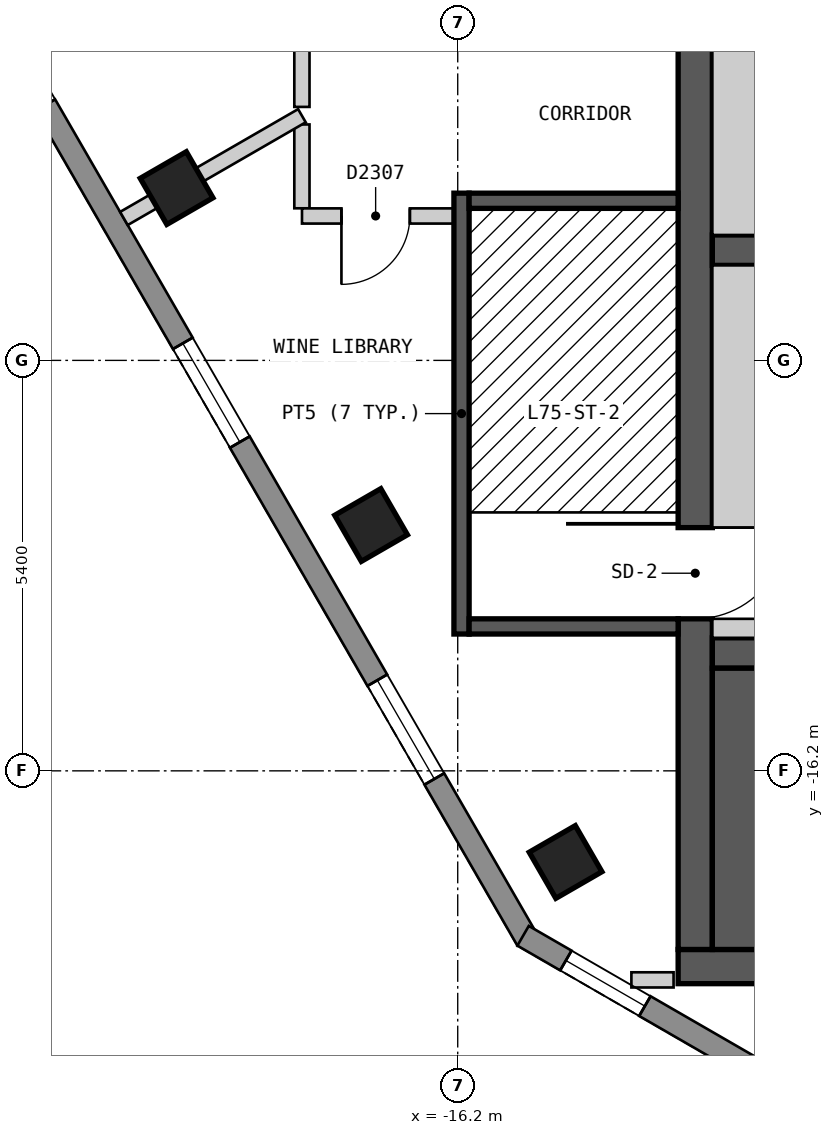
"""IFC4 building model, lengths in metres.
Left out: names, types, materials, properties, quantities, classifications, styles, units other than length and angle.
Written with IfcOpenShell. Run it as: python <this file> out.ifc"""

import sys

from ifc_helpers import new_model, si_unit, direction, frame, frame_2d, origin, origin_2d, place, context, subcontext, project, spatial, polyline, rectangle, outline, extrude, element, fill, save


model = new_model("IFC4")
c1 = context("Model", 3, precision=1e-05, world=origin(), true_north=direction((0.0, 1.0)))
c2 = subcontext(c1, "Body", "Model", "MODEL_VIEW")
j1 = project(units=[si_unit("LENGTHUNIT", "METRE"), si_unit("PLANEANGLEUNIT", "RADIAN")], contexts=[c1])
p1 = place(None, origin())
s1 = spatial("IfcSite", under=j1, at=p1, CompositionType="ELEMENT")
p2 = place(p1, origin())
s2 = spatial("IfcBuilding", under=s1, at=p2, CompositionType="ELEMENT")
p3 = place(p2, frame((0.0, 0.0, 241.8)))
s3 = spatial("IfcBuildingStorey", under=s2, at=p3, CompositionType="ELEMENT", Elevation=241.8)
for number, where, z_axis, x_axis in (
    (1, (-19.899, -8.533, 0.0), (0.0, 0.0, 1.0), (0.5, -0.866, 0.0)),
    (2, (-17.34, -12.966, 0.0), (0.0, 0.0, 1.0), (0.5, -0.866, 0.0)),
    (3, (-14.781, -17.399, 0.0), (0.0, 0.0, 1.0), (0.5, -0.866, 0.0)),
):
    element("IfcColumn", number, at=place(p3, frame(where, z_axis=z_axis, x_axis=x_axis)), inside=s3, PredefinedType="COLUMN", context=c2, shape_type="SweptSolid", body=[
        extrude(rectangle(XDim=0.7, YDim=0.7, at=origin_2d()), origin(), (0.0, 0.0, 1.0), 3.0),
    ])
p4 = place(p3, frame((-13.3, -18.775, 0.0), z_axis=(0.0, 0.0, 1.0), x_axis=(1.0, 0.0, 0.0)))
e4 = element("IfcWall", 4, at=p4, inside=s3, PredefinedType="SHEAR", context=c2, shape_type="SweptSolid", body=[
    extrude(rectangle(XDim=26.6, YDim=0.45, at=frame_2d((13.3, 0.0))), origin(), (0.0, 0.0, 1.0), 2.2),
])
p5 = place(p4, frame((10.25, 0.0, 0.0)))
e5 = element("IfcOpeningElement", 5, at=p5, cuts=e4, PredefinedType="OPENING", context=c2, shape_type="SweptSolid", body=[
    extrude(rectangle(XDim=0.9, YDim=2.1, at=frame_2d((0.45, 1.05))), frame((0.0, 0.235, 0.0), z_axis=(0.0, -1.0, 0.0), x_axis=(1.0, 0.0, 0.0)), (0.0, 0.0, 1.0), 0.47),
])
p6 = place(p3, frame((-13.075, -18.55, 0.0), z_axis=(0.0, 0.0, 1.0), x_axis=(0.0, 1.0, 0.0)))
e6 = element("IfcWall", 6, at=p6, inside=s3, PredefinedType="SHEAR", context=c2, shape_type="SweptSolid", body=[
    extrude(rectangle(XDim=13.1, YDim=0.45, at=frame_2d((6.55, 0.0))), origin(), (0.0, 0.0, 1.0), 2.2),
])
p7 = place(p6, frame((4.35, 0.0, 0.0)))
e7 = element("IfcOpeningElement", 7, at=p7, cuts=e6, PredefinedType="OPENING", context=c2, shape_type="SweptSolid", body=[
    extrude(rectangle(XDim=1.2, YDim=2.1, at=frame_2d((0.6, 1.05))), frame((0.0, 0.235, 0.0), z_axis=(0.0, -1.0, 0.0), x_axis=(1.0, 0.0, 0.0)), (0.0, 0.0, 1.0), 0.47),
])
p8 = place(p3, frame((-12.85, -14.65, 0.0), z_axis=(0.0, 0.0, 1.0), x_axis=(1.0, 0.0, 0.0)))
e8 = element("IfcWall", 8, at=p8, inside=s3, PredefinedType="SHEAR", context=c2, shape_type="SweptSolid", body=[
    extrude(rectangle(XDim=25.7, YDim=0.4, at=frame_2d((12.85, 0.0))), origin(), (0.0, 0.0, 1.0), 2.2),
])
p9 = place(p8, frame((2.05, 0.0, 0.0), z_axis=(0.0, 0.0, 1.0), x_axis=(-1.0, 0.0, 0.0)))
e9 = element("IfcOpeningElement", 9, at=p9, cuts=e8, PredefinedType="OPENING", context=c2, shape_type="SweptSolid", body=[
    extrude(rectangle(XDim=1.2, YDim=2.1, at=frame_2d((0.6, 1.05))), frame((0.0, 0.21, 0.0), z_axis=(0.0, -1.0, 0.0), x_axis=(1.0, 0.0, 0.0)), (0.0, 0.0, 1.0), 0.42),
])
p10 = place(p8, frame((24.9, 0.0, 0.0), z_axis=(0.0, 0.0, 1.0), x_axis=(-1.0, 0.0, 0.0)))
e10 = element("IfcOpeningElement", 10, at=p10, cuts=e8, PredefinedType="OPENING", context=c2, shape_type="SweptSolid", body=[
    extrude(rectangle(XDim=1.2, YDim=2.1, at=frame_2d((0.6, 1.05))), frame((0.0, 0.21, 0.0), z_axis=(0.0, -1.0, 0.0), x_axis=(1.0, 0.0, 0.0)), (0.0, 0.0, 1.0), 0.42),
])
p11 = place(p8, frame((10.0, 0.0, 0.0), z_axis=(0.0, 0.0, 1.0), x_axis=(-1.0, 0.0, 0.0)))
e11 = element("IfcOpeningElement", 11, at=p11, cuts=e8, PredefinedType="OPENING", context=c2, shape_type="SweptSolid", body=[
    extrude(rectangle(XDim=1.0, YDim=2.1, at=frame_2d((0.5, 1.05))), frame((0.0, 0.21, 0.0), z_axis=(0.0, -1.0, 0.0), x_axis=(1.0, 0.0, 0.0)), (0.0, 0.0, 1.0), 0.42),
])
p12 = place(p8, frame((16.4, 0.0, 0.0), z_axis=(0.0, 0.0, 1.0), x_axis=(-1.0, 0.0, 0.0)))
e12 = element("IfcOpeningElement", 12, at=p12, cuts=e8, PredefinedType="OPENING", context=c2, shape_type="SweptSolid", body=[
    extrude(rectangle(XDim=1.0, YDim=2.1, at=frame_2d((0.5, 1.05))), frame((0.0, 0.21, 0.0), z_axis=(0.0, -1.0, 0.0), x_axis=(1.0, 0.0, 0.0)), (0.0, 0.0, 1.0), 0.42),
])
p13 = place(p3, frame((-12.85, -9.35, 0.0), z_axis=(0.0, 0.0, 1.0), x_axis=(1.0, 0.0, 0.0)))
e13 = element("IfcWall", 13, at=p13, inside=s3, PredefinedType="SHEAR", context=c2, shape_type="SweptSolid", body=[
    extrude(rectangle(XDim=23.05, YDim=0.4, at=frame_2d((11.525, 0.0))), origin(), (0.0, 0.0, 1.0), 2.2),
])
p14 = place(p13, frame((1.45, 0.0, 0.0)))
e14 = element("IfcOpeningElement", 14, at=p14, cuts=e13, PredefinedType="OPENING", context=c2, shape_type="SweptSolid", body=[
    extrude(rectangle(XDim=1.1, YDim=2.1, at=frame_2d((0.55, 1.05))), frame((0.0, 0.21, 0.0), z_axis=(0.0, -1.0, 0.0), x_axis=(1.0, 0.0, 0.0)), (0.0, 0.0, 1.0), 0.42),
])
p15 = place(p13, frame((4.25, 0.0, 0.0)))
e15 = element("IfcOpeningElement", 15, at=p15, cuts=e13, PredefinedType="OPENING", context=c2, shape_type="SweptSolid", body=[
    extrude(rectangle(XDim=1.1, YDim=2.1, at=frame_2d((0.55, 1.05))), frame((0.0, 0.21, 0.0), z_axis=(0.0, -1.0, 0.0), x_axis=(1.0, 0.0, 0.0)), (0.0, 0.0, 1.0), 0.42),
])
p16 = place(p13, frame((7.05, 0.0, 0.0)))
e16 = element("IfcOpeningElement", 16, at=p16, cuts=e13, PredefinedType="OPENING", context=c2, shape_type="SweptSolid", body=[
    extrude(rectangle(XDim=1.1, YDim=2.1, at=frame_2d((0.55, 1.05))), frame((0.0, 0.21, 0.0), z_axis=(0.0, -1.0, 0.0), x_axis=(1.0, 0.0, 0.0)), (0.0, 0.0, 1.0), 0.42),
])
p17 = place(p13, frame((9.35, 0.0, 0.0)))
e17 = element("IfcOpeningElement", 17, at=p17, cuts=e13, PredefinedType="OPENING", context=c2, shape_type="SweptSolid", body=[
    extrude(rectangle(XDim=1.1, YDim=2.1, at=frame_2d((0.55, 1.05))), frame((0.0, 0.21, 0.0), z_axis=(0.0, -1.0, 0.0), x_axis=(1.0, 0.0, 0.0)), (0.0, 0.0, 1.0), 0.42),
])
p18 = place(p13, frame((11.65, 0.0, 0.0)))
e18 = element("IfcOpeningElement", 18, at=p18, cuts=e13, PredefinedType="OPENING", context=c2, shape_type="SweptSolid", body=[
    extrude(rectangle(XDim=1.1, YDim=2.1, at=frame_2d((0.55, 1.05))), frame((0.0, 0.21, 0.0), z_axis=(0.0, -1.0, 0.0), x_axis=(1.0, 0.0, 0.0)), (0.0, 0.0, 1.0), 0.42),
])
p19 = place(p13, frame((13.95, 0.0, 0.0)))
e19 = element("IfcOpeningElement", 19, at=p19, cuts=e13, PredefinedType="OPENING", context=c2, shape_type="SweptSolid", body=[
    extrude(rectangle(XDim=1.1, YDim=2.1, at=frame_2d((0.55, 1.05))), frame((0.0, 0.21, 0.0), z_axis=(0.0, -1.0, 0.0), x_axis=(1.0, 0.0, 0.0)), (0.0, 0.0, 1.0), 0.42),
])
p20 = place(p13, frame((16.25, 0.0, 0.0)))
e20 = element("IfcOpeningElement", 20, at=p20, cuts=e13, PredefinedType="OPENING", context=c2, shape_type="SweptSolid", body=[
    extrude(rectangle(XDim=1.1, YDim=2.1, at=frame_2d((0.55, 1.05))), frame((0.0, 0.21, 0.0), z_axis=(0.0, -1.0, 0.0), x_axis=(1.0, 0.0, 0.0)), (0.0, 0.0, 1.0), 0.42),
])
p21 = place(p13, frame((18.55, 0.0, 0.0)))
e21 = element("IfcOpeningElement", 21, at=p21, cuts=e13, PredefinedType="OPENING", context=c2, shape_type="SweptSolid", body=[
    extrude(rectangle(XDim=1.1, YDim=2.1, at=frame_2d((0.55, 1.05))), frame((0.0, 0.21, 0.0), z_axis=(0.0, -1.0, 0.0), x_axis=(1.0, 0.0, 0.0)), (0.0, 0.0, 1.0), 0.42),
])
p22 = place(p13, frame((20.95, 0.0, 0.0)))
e22 = element("IfcOpeningElement", 22, at=p22, cuts=e13, PredefinedType="OPENING", context=c2, shape_type="SweptSolid", body=[
    extrude(rectangle(XDim=1.1, YDim=2.1, at=frame_2d((0.55, 1.05))), frame((0.0, 0.21, 0.0), z_axis=(0.0, -1.0, 0.0), x_axis=(1.0, 0.0, 0.0)), (0.0, 0.0, 1.0), 0.42),
])
p23 = place(p3, frame((-23.599, -4.025, 0.0), z_axis=(0.0, 0.0, 1.0), x_axis=(0.500012653391, -0.866018098222, 0.0)))
e23 = element("IfcWall", 23, at=p23, inside=s3, PredefinedType="SOLIDWALL", context=c2, shape_type="SweptSolid", body=[
    extrude(outline(polyline([(0.0, -0.15), (16.628, -0.15), (16.548, 0.15), (0.08, 0.15), (0.0, -0.15)])), origin(), (0.0, 0.0, 1.0), 2.2),
])
p24 = place(p23, frame((2.444, 0.0, 0.15)))
e24 = element("IfcOpeningElement", 24, at=p24, cuts=e23, PredefinedType="OPENING", context=c2, shape_type="SweptSolid", body=[
    extrude(rectangle(XDim=1.5, YDim=2.1, at=frame_2d((0.75, 1.05))), frame((0.0, 0.16, 0.0), z_axis=(0.0, -1.0, 0.0), x_axis=(1.0, 0.0, 0.0)), (0.0, 0.0, 1.0), 0.32),
])
p25 = place(p23, frame((7.564, 0.0, 0.15)))
e25 = element("IfcOpeningElement", 25, at=p25, cuts=e23, PredefinedType="OPENING", context=c2, shape_type="SweptSolid", body=[
    extrude(rectangle(XDim=1.5, YDim=2.1, at=frame_2d((0.75, 1.05))), frame((0.0, 0.16, 0.0), z_axis=(0.0, -1.0, 0.0), x_axis=(1.0, 0.0, 0.0)), (0.0, 0.0, 1.0), 0.32),
])
p26 = place(p23, frame((12.682, 0.0, 0.15)))
e26 = element("IfcOpeningElement", 26, at=p26, cuts=e23, PredefinedType="OPENING", context=c2, shape_type="SweptSolid", body=[
    extrude(rectangle(XDim=1.5, YDim=2.1, at=frame_2d((0.75, 1.05))), frame((0.0, 0.16, 0.0), z_axis=(0.0, -1.0, 0.0), x_axis=(1.0, 0.0, 0.0)), (0.0, 0.0, 1.0), 0.32),
])
p27 = place(p3, frame((-15.34, -18.37, 0.0), z_axis=(0.0, 0.0, 1.0), x_axis=(0.866022959057, -0.500004234368, 0.0)))
e27 = element("IfcWall", 27, at=p27, inside=s3, PredefinedType="SOLIDWALL", context=c2, shape_type="SweptSolid", body=[
    extrude(outline(polyline([(0.0, -0.15), (5.0, -0.15), (4.92, 0.15), (0.08, 0.15), (0.0, -0.15)])), origin(), (0.0, 0.0, 1.0), 2.2),
])
p28 = place(p27, frame((0.65, 0.0, 0.15)))
e28 = element("IfcOpeningElement", 28, at=p28, cuts=e27, PredefinedType="OPENING", context=c2, shape_type="SweptSolid", body=[
    extrude(rectangle(XDim=1.2, YDim=2.1, at=frame_2d((0.6, 1.05))), frame((0.0, 0.16, 0.0), z_axis=(0.0, -1.0, 0.0), x_axis=(1.0, 0.0, 0.0)), (0.0, 0.0, 1.0), 0.32),
])
p29 = place(p3, frame((-18.25, -7.696, 0.0), z_axis=(0.0, 0.0, 1.0), x_axis=(0.0, -1.0, 0.0)))
e29 = element("IfcWall", 29, at=p29, inside=s3, PredefinedType="PARTITIONING", context=c2, shape_type="SweptSolid", body=[
    extrude(rectangle(XDim=1.103, YDim=0.2, at=frame_2d((0.552, 0.0))), origin(), (0.0, 0.0, 1.0), 2.2),
])
p30 = place(p3, frame((-18.249, -8.9, 0.0), z_axis=(0.0, 0.0, 1.0), x_axis=(1.0, 0.0, 0.0)))
e30 = element("IfcWall", 30, at=p30, inside=s3, PredefinedType="PARTITIONING", context=c2, shape_type="SweptSolid", body=[
    extrude(rectangle(XDim=2.199, YDim=0.2, at=frame_2d((1.1, 0.0))), origin(), (0.0, 0.0, 1.0), 2.2),
])
p31 = place(p30, frame((0.519, 0.0, 0.0)))
e31 = element("IfcOpeningElement", 31, at=p31, cuts=e30, PredefinedType="OPENING", context=c2, shape_type="SweptSolid", body=[
    extrude(rectangle(XDim=0.9, YDim=2.1, at=frame_2d((0.45, 1.05))), frame((0.0, 0.11, 0.0), z_axis=(0.0, -1.0, 0.0), x_axis=(1.0, 0.0, 0.0)), (0.0, 0.0, 1.0), 0.22),
])
p32 = place(p3, frame((-18.25, -7.465, 0.0), z_axis=(0.0, 0.0, 1.0), x_axis=(0.0, 1.0, 0.0)))
e32 = element("IfcWall", 32, at=p32, inside=s3, PredefinedType="PARTITIONING", context=c2, shape_type="SweptSolid", body=[
    extrude(rectangle(XDim=0.864, YDim=0.2, at=frame_2d((0.432, 0.0))), origin(), (0.0, 0.0, 1.0), 2.2),
])
p33 = place(p3, frame((-13.915, -18.95, 0.0), z_axis=(0.0, 0.0, 1.0), x_axis=(1.0, 0.0, 0.0)))
e33 = element("IfcWall", 33, at=p33, inside=s3, PredefinedType="PARTITIONING", context=c2, shape_type="SweptSolid", body=[
    extrude(rectangle(XDim=0.555, YDim=0.2, at=frame_2d((0.277, 0.0))), origin(), (0.0, 0.0, 1.0), 2.2),
])
p34 = place(p3, frame((-20.592, -8.933, 0.0), z_axis=(0.0, 0.0, 1.0), x_axis=(0.866045775131, 0.499964714133, 0.0)))
e34 = element("IfcWall", 34, at=p34, inside=s3, PredefinedType="PARTITIONING", context=c2, shape_type="SweptSolid", body=[
    extrude(rectangle(XDim=2.704, YDim=0.2, at=frame_2d((1.352, 0.0))), origin(), (0.0, 0.0, 1.0), 2.2),
])
p35 = place(p3, frame((-16.15, -14.4, 0.0), z_axis=(0.0, 0.0, 1.0), x_axis=(0.0, 1.0, 0.0)))
e35 = element("IfcWall", 35, at=p35, inside=s3, PredefinedType="SOLIDWALL", context=c2, shape_type="SweptSolid", body=[
    extrude(rectangle(XDim=5.8, YDim=0.2, at=frame_2d((2.9, 0.0))), origin(), (0.0, 0.0, 1.0), 2.2),
])
for number, where, z_axis, x_axis in (
    (36, (-16.05, -14.3, 0.0), (0.0, 0.0, 1.0), (1.0, 0.0, 0.0)),
    (37, (-16.05, -8.7, 0.0), (0.0, 0.0, 1.0), (1.0, 0.0, 0.0)),
):
    element("IfcWall", number, at=place(p3, frame(where, z_axis=z_axis, x_axis=x_axis)), inside=s3, PredefinedType="SOLIDWALL", context=c2, shape_type="SweptSolid", body=[
        extrude(rectangle(XDim=2.75, YDim=0.2, at=frame_2d((1.375, 0.0))), origin(), (0.0, 0.0, 1.0), 2.2),
    ])
p36 = place(p3, frame((-12.475, -18.55, 0.0), z_axis=(0.0, 0.0, 1.0), x_axis=(0.0, 1.0, 0.0)))
e38 = element("IfcWall", 38, at=p36, inside=s3, PredefinedType="SOLIDWALL", context=c2, shape_type="SweptSolid", body=[
    extrude(rectangle(XDim=3.7, YDim=0.75, at=frame_2d((1.85, 0.0))), origin(), (0.0, 0.0, 1.0), 2.2),
])
p37 = place(p3, frame((-12.85, -14.325, 0.0), z_axis=(0.0, 0.0, 1.0), x_axis=(1.0, 0.0, 0.0)))
e39 = element("IfcWall", 39, at=p37, inside=s3, PredefinedType="PARTITIONING", context=c2, shape_type="SweptSolid", body=[
    extrude(rectangle(XDim=0.75, YDim=0.25, at=frame_2d((0.375, 0.0))), origin(), (0.0, 0.0, 1.0), 2.2),
])
p38 = place(p3, frame((-12.475, -13.0, 0.0), z_axis=(0.0, 0.0, 1.0), x_axis=(0.0, 1.0, 0.0)))
e40 = element("IfcWall", 40, at=p38, inside=s3, PredefinedType="PARTITIONING", context=c2, shape_type="SweptSolid", body=[
    extrude(rectangle(XDim=3.45, YDim=0.75, at=frame_2d((1.725, 0.0))), origin(), (0.0, 0.0, 1.0), 2.2),
])
p39 = place(p3, frame((-12.475, -9.15, 0.0), z_axis=(0.0, 0.0, 1.0), x_axis=(0.0, 1.0, 0.0)))
e41 = element("IfcWall", 41, at=p39, inside=s3, PredefinedType="SOLIDWALL", context=c2, shape_type="SweptSolid", body=[
    extrude(rectangle(XDim=3.7, YDim=0.75, at=frame_2d((1.85, 0.0))), origin(), (0.0, 0.0, 1.0), 2.2),
])
p40 = place(p25, origin())
e42 = element("IfcWindow", 42, at=p40, inside=s3, PartitioningType="SINGLE_PANEL", PredefinedType="WINDOW", context=c2, shape_type="SweptSolid", body=[
    extrude(rectangle(XDim=1.5, YDim=2.1, at=frame_2d((0.75, 1.05))), frame((0.0, 0.03, 0.0), z_axis=(0.0, -1.0, 0.0), x_axis=(1.0, 0.0, 0.0)), (0.0, 0.0, 1.0), 0.06),
])
fill(e25, e42)
p41 = place(p26, origin())
e43 = element("IfcWindow", 43, at=p41, inside=s3, PartitioningType="SINGLE_PANEL", PredefinedType="WINDOW", context=c2, shape_type="SweptSolid", body=[
    extrude(rectangle(XDim=1.5, YDim=2.1, at=frame_2d((0.75, 1.05))), frame((0.0, 0.03, 0.0), z_axis=(0.0, -1.0, 0.0), x_axis=(1.0, 0.0, 0.0)), (0.0, 0.0, 1.0), 0.06),
])
fill(e26, e43)
p42 = place(p28, origin())
e44 = element("IfcWindow", 44, at=p42, inside=s3, PartitioningType="SINGLE_PANEL", PredefinedType="WINDOW", context=c2, shape_type="SweptSolid", body=[
    extrude(rectangle(XDim=1.2, YDim=2.1, at=frame_2d((0.6, 1.05))), frame((0.0, 0.03, 0.0), z_axis=(0.0, -1.0, 0.0), x_axis=(1.0, 0.0, 0.0)), (0.0, 0.0, 1.0), 0.06),
])
fill(e28, e44)
p43 = place(p31, origin())
e45 = element("IfcDoor", 45, at=p43, inside=s3, OperationType="SINGLE_SWING_LEFT", PredefinedType="DOOR", context=c2, shape_type="SweptSolid", body=[
    extrude(rectangle(XDim=0.9, YDim=2.1, at=frame_2d((0.45, 1.05))), frame((0.0, 0.025, 0.0), z_axis=(0.0, -1.0, 0.0), x_axis=(1.0, 0.0, 0.0)), (0.0, 0.0, 1.0), 0.05),
])
fill(e31, e45)
p44 = place(p7, origin())
e46 = element("IfcDoor", 46, at=p44, inside=s3, OperationType="SINGLE_SWING_RIGHT", PredefinedType="DOOR", context=c2, shape_type="SweptSolid", body=[
    extrude(rectangle(XDim=1.2, YDim=2.1, at=frame_2d((0.6, 1.05))), frame((0.0, 0.025, 0.0), z_axis=(0.0, -1.0, 0.0), x_axis=(1.0, 0.0, 0.0)), (0.0, 0.0, 1.0), 0.05),
])
fill(e7, e46)
save(model, sys.argv[1])
